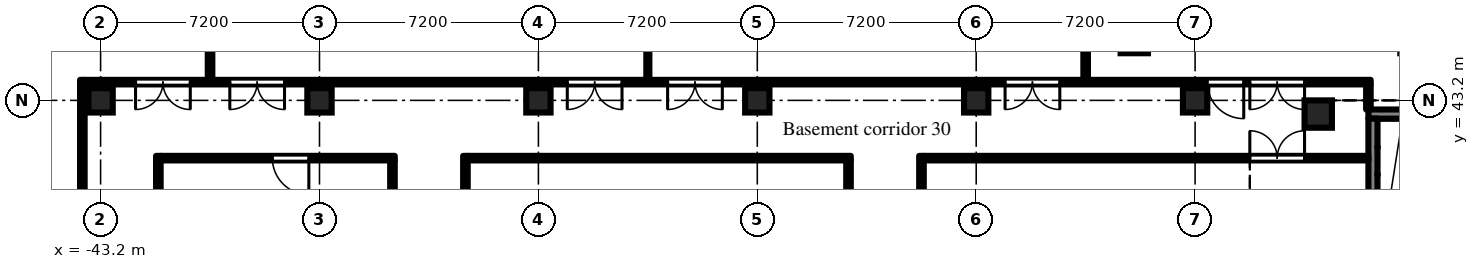
"""IFC4 building model, lengths in metres.
Left out: names, types, materials, properties, quantities, classifications, styles, units other than length and angle.
Written with IfcOpenShell. Run it as: python <this file> out.ifc"""

import sys

from ifc_helpers import new_model, si_unit, direction, frame, frame_2d, origin, origin_2d, place, context, subcontext, project, spatial, rectangle, extrude, element, fill, save


model = new_model("IFC4")
c1 = context("Model", 3, precision=1e-05, world=origin(), true_north=direction((0.0, 1.0)))
c2 = subcontext(c1, "Body", "Model", "MODEL_VIEW")
j1 = project(units=[si_unit("LENGTHUNIT", "METRE"), si_unit("PLANEANGLEUNIT", "RADIAN")], contexts=[c1])
p1 = place(None, origin())
s1 = spatial("IfcSite", under=j1, at=p1, CompositionType="ELEMENT")
p2 = place(p1, origin())
s2 = spatial("IfcBuilding", under=s1, at=p2, CompositionType="ELEMENT")
p3 = place(p2, frame((0.0, 0.0, -4.8)))
s3 = spatial("IfcBuildingStorey", under=s2, at=p3, CompositionType="ELEMENT", Elevation=-4.8)
p4 = place(p3, frame((-3.15, 42.75, -0.5), z_axis=(0.0, 0.0, 1.0), x_axis=(1.0, 0.0, 0.0)))
e1 = element("IfcColumn", 1, at=p4, inside=s3, PredefinedType="COLUMN", context=c2, shape_type="SweptSolid", body=[
    extrude(rectangle(XDim=0.9, YDim=0.9, at=origin_2d()), origin(), (0.0, 0.0, 1.0), 5.3),
])
for number, where, z_axis, x_axis in (
    (2, (-43.2, 43.2, -0.5), (0.0, 0.0, 1.0), (1.0, 0.0, 0.0)),
    (3, (-36.0, 43.2, -0.5), (0.0, 0.0, 1.0), (1.0, 0.0, 0.0)),
    (4, (-28.8, 43.2, -0.5), (0.0, 0.0, 1.0), (1.0, 0.0, 0.0)),
    (5, (-21.6, 43.2, -0.5), (0.0, 0.0, 1.0), (1.0, 0.0, 0.0)),
    (6, (-14.4, 43.2, -0.5), (0.0, 0.0, 1.0), (1.0, 0.0, 0.0)),
    (7, (-7.2, 43.2, -0.5), (0.0, 0.0, 1.0), (1.0, 0.0, 0.0)),
):
    element("IfcColumn", number, at=place(p3, frame(where, z_axis=z_axis, x_axis=x_axis)), inside=s3, PredefinedType="COLUMN", context=c2, shape_type="SweptSolid", body=[
        extrude(rectangle(XDim=0.8, YDim=0.8, at=origin_2d()), origin(), (0.0, 0.0, 1.0), 5.3),
    ])
p5 = place(p3, frame((-9.2, 45.2, -0.5), z_axis=(0.0, 0.0, 1.0), x_axis=(1.0, 0.0, 0.0)))
e8 = element("IfcColumn", 8, at=p5, inside=s3, PredefinedType="COLUMN", context=c2, shape_type="SweptSolid", body=[
    extrude(rectangle(XDim=0.9, YDim=0.9, at=origin_2d()), origin(), (0.0, 0.0, 1.0), 5.3),
])
p6 = place(p3, frame((-1.5, 42.75, 0.0), z_axis=(0.0, 0.0, 1.0), x_axis=(1.0, 0.0, 0.0)))
e9 = element("IfcWall", 9, at=p6, inside=s3, PredefinedType="SHEAR", context=c2, shape_type="SweptSolid", body=[
    extrude(rectangle(XDim=3.0, YDim=0.3, at=frame_2d((1.5, 0.0))), origin(), (0.0, 0.0, 1.0), 4.35),
])
p7 = place(p3, frame((-1.35, 36.8, 0.0), z_axis=(0.0, 0.0, 1.0), x_axis=(0.0, 1.0, 0.0)))
e10 = element("IfcWall", 10, at=p7, inside=s3, PredefinedType="SHEAR", context=c2, shape_type="SweptSolid", body=[
    extrude(rectangle(XDim=5.8, YDim=0.3, at=frame_2d((2.9, 0.0))), origin(), (0.0, 0.0, 1.0), 4.35),
])
p8 = place(p3, frame((-43.8, 33.525, 0.0), z_axis=(0.0, 0.0, 1.0), x_axis=(0.0, 1.0, 0.0)))
e11 = element("IfcWall", 11, at=p8, inside=s3, PredefinedType="PARTITIONING", context=c2, shape_type="SweptSolid", body=[
    extrude(rectangle(XDim=10.35, YDim=0.15, at=frame_2d((5.175, 0.0))), origin(), (0.0, 0.0, 1.0), 4.35),
])
p9 = place(p8, frame((4.025, 0.0, 0.0)))
e12 = element("IfcOpeningElement", 12, at=p9, cuts=e11, PredefinedType="OPENING", context=c2, shape_type="SweptSolid", body=[
    extrude(rectangle(XDim=1.2, YDim=2.1, at=frame_2d((0.6, 1.05))), frame((0.0, 0.085, 0.0), z_axis=(0.0, -1.0, 0.0), x_axis=(1.0, 0.0, 0.0)), (0.0, 0.0, 1.0), 0.17),
])
p10 = place(p3, frame((-43.725, 43.8, 0.0), z_axis=(0.0, 0.0, 1.0), x_axis=(1.0, 0.0, 0.0)))
e13 = element("IfcWall", 13, at=p10, inside=s3, PredefinedType="PARTITIONING", context=c2, shape_type="SweptSolid", body=[
    extrude(rectangle(XDim=42.3, YDim=0.15, at=frame_2d((21.15, 0.0))), origin(), (0.0, 0.0, 1.0), 4.35),
])
p11 = place(p10, frame((4.775, 0.0, 0.0)))
e14 = element("IfcOpeningElement", 14, at=p11, cuts=e13, PredefinedType="OPENING", context=c2, shape_type="SweptSolid", body=[
    extrude(rectangle(XDim=1.8, YDim=2.1, at=frame_2d((0.9, 1.05))), frame((0.0, 0.085, 0.0), z_axis=(0.0, -1.0, 0.0), x_axis=(1.0, 0.0, 0.0)), (0.0, 0.0, 1.0), 0.17),
])
p12 = place(p10, frame((15.875, 0.0, 0.0)))
e15 = element("IfcOpeningElement", 15, at=p12, cuts=e13, PredefinedType="OPENING", context=c2, shape_type="SweptSolid", body=[
    extrude(rectangle(XDim=1.8, YDim=2.1, at=frame_2d((0.9, 1.05))), frame((0.0, 0.085, 0.0), z_axis=(0.0, -1.0, 0.0), x_axis=(1.0, 0.0, 0.0)), (0.0, 0.0, 1.0), 0.17),
])
p13 = place(p10, frame((19.175, 0.0, 0.0)))
e16 = element("IfcOpeningElement", 16, at=p13, cuts=e13, PredefinedType="OPENING", context=c2, shape_type="SweptSolid", body=[
    extrude(rectangle(XDim=1.8, YDim=2.1, at=frame_2d((0.9, 1.05))), frame((0.0, 0.085, 0.0), z_axis=(0.0, -1.0, 0.0), x_axis=(1.0, 0.0, 0.0)), (0.0, 0.0, 1.0), 0.17),
])
p14 = place(p10, frame((30.275, 0.0, 0.0)))
e17 = element("IfcOpeningElement", 17, at=p14, cuts=e13, PredefinedType="OPENING", context=c2, shape_type="SweptSolid", body=[
    extrude(rectangle(XDim=1.8, YDim=2.1, at=frame_2d((0.9, 1.05))), frame((0.0, 0.085, 0.0), z_axis=(0.0, -1.0, 0.0), x_axis=(1.0, 0.0, 0.0)), (0.0, 0.0, 1.0), 0.17),
])
p15 = place(p10, frame((36.925, 0.0, 0.0)))
e18 = element("IfcOpeningElement", 18, at=p15, cuts=e13, PredefinedType="OPENING", context=c2, shape_type="SweptSolid", body=[
    extrude(rectangle(XDim=1.2, YDim=2.1, at=frame_2d((0.6, 1.05))), frame((0.0, 0.085, 0.0), z_axis=(0.0, -1.0, 0.0), x_axis=(1.0, 0.0, 0.0)), (0.0, 0.0, 1.0), 0.17),
])
p16 = place(p10, frame((38.325, 0.0, 0.0)))
e19 = element("IfcOpeningElement", 19, at=p16, cuts=e13, PredefinedType="OPENING", context=c2, shape_type="SweptSolid", body=[
    extrude(rectangle(XDim=1.8, YDim=2.1, at=frame_2d((0.9, 1.05))), frame((0.0, 0.085, 0.0), z_axis=(0.0, -1.0, 0.0), x_axis=(1.0, 0.0, 0.0)), (0.0, 0.0, 1.0), 0.17),
])
p17 = place(p10, frame((1.675, 0.0, 0.0)))
e20 = element("IfcOpeningElement", 20, at=p17, cuts=e13, PredefinedType="OPENING", context=c2, shape_type="SweptSolid", body=[
    extrude(rectangle(XDim=1.8, YDim=2.1, at=frame_2d((0.9, 1.05))), frame((0.0, 0.085, 0.0), z_axis=(0.0, -1.0, 0.0), x_axis=(1.0, 0.0, 0.0)), (0.0, 0.0, 1.0), 0.17),
])
p18 = place(p3, frame((-41.3, 33.525, 0.0), z_axis=(0.0, 0.0, 1.0), x_axis=(0.0, 1.0, 0.0)))
e21 = element("IfcWall", 21, at=p18, inside=s3, PredefinedType="PARTITIONING", context=c2, shape_type="SweptSolid", body=[
    extrude(rectangle(XDim=7.85, YDim=0.15, at=frame_2d((3.925, 0.0))), origin(), (0.0, 0.0, 1.0), 4.35),
])
p19 = place(p3, frame((-41.225, 41.3, 0.0), z_axis=(0.0, 0.0, 1.0), x_axis=(1.0, 0.0, 0.0)))
e22 = element("IfcWall", 22, at=p19, inside=s3, PredefinedType="PARTITIONING", context=c2, shape_type="SweptSolid", body=[
    extrude(rectangle(XDim=7.7, YDim=0.15, at=frame_2d((3.85, 0.0))), origin(), (0.0, 0.0, 1.0), 4.35),
])
p20 = place(p19, frame((3.675, 0.0, 0.0)))
e23 = element("IfcOpeningElement", 23, at=p20, cuts=e22, PredefinedType="OPENING", context=c2, shape_type="SweptSolid", body=[
    extrude(rectangle(XDim=1.2, YDim=2.1, at=frame_2d((0.6, 1.05))), frame((0.0, 0.085, 0.0), z_axis=(0.0, -1.0, 0.0), x_axis=(1.0, 0.0, 0.0)), (0.0, 0.0, 1.0), 0.17),
])
p21 = place(p3, frame((-39.6, 43.875, 0.0), z_axis=(0.0, 0.0, 1.0), x_axis=(0.0, 1.0, 0.0)))
e24 = element("IfcWall", 24, at=p21, inside=s3, PredefinedType="PARTITIONING", context=c2, shape_type="SweptSolid", body=[
    extrude(rectangle(XDim=6.345, YDim=0.15, at=frame_2d((3.172, 0.0))), origin(), (0.0, 0.0, 1.0), 4.35),
])
p22 = place(p3, frame((-33.6, 33.675, 0.0), z_axis=(0.0, 0.0, 1.0), x_axis=(0.0, 1.0, 0.0)))
e25 = element("IfcWall", 25, at=p22, inside=s3, PredefinedType="PARTITIONING", context=c2, shape_type="SweptSolid", body=[
    extrude(rectangle(XDim=7.55, YDim=0.15, at=frame_2d((3.775, 0.0))), origin(), (0.0, 0.0, 1.0), 4.35),
])
p23 = place(p3, frame((-31.2, 33.525, 0.0), z_axis=(0.0, 0.0, 1.0), x_axis=(0.0, 1.0, 0.0)))
e26 = element("IfcWall", 26, at=p23, inside=s3, PredefinedType="PARTITIONING", context=c2, shape_type="SweptSolid", body=[
    extrude(rectangle(XDim=7.85, YDim=0.15, at=frame_2d((3.925, 0.0))), origin(), (0.0, 0.0, 1.0), 4.35),
])
p24 = place(p23, frame((3.525, 0.0, 0.0)))
e27 = element("IfcOpeningElement", 27, at=p24, cuts=e26, PredefinedType="OPENING", context=c2, shape_type="SweptSolid", body=[
    extrude(rectangle(XDim=1.8, YDim=2.1, at=frame_2d((0.9, 1.05))), frame((0.0, 0.085, 0.0), z_axis=(0.0, -1.0, 0.0), x_axis=(1.0, 0.0, 0.0)), (0.0, 0.0, 1.0), 0.17),
])
p25 = place(p3, frame((-31.125, 41.3, 0.0), z_axis=(0.0, 0.0, 1.0), x_axis=(1.0, 0.0, 0.0)))
e28 = element("IfcWall", 28, at=p25, inside=s3, PredefinedType="PARTITIONING", context=c2, shape_type="SweptSolid", body=[
    extrude(rectangle(XDim=12.6, YDim=0.15, at=frame_2d((6.3, 0.0))), origin(), (0.0, 0.0, 1.0), 4.35),
])
p26 = place(p3, frame((-25.2, 43.875, 0.0), z_axis=(0.0, 0.0, 1.0), x_axis=(0.0, 1.0, 0.0)))
e29 = element("IfcWall", 29, at=p26, inside=s3, PredefinedType="PARTITIONING", context=c2, shape_type="SweptSolid", body=[
    extrude(rectangle(XDim=6.345, YDim=0.1, at=frame_2d((3.172, 0.0))), origin(), (0.0, 0.0, 1.0), 4.35),
])
p27 = place(p3, frame((-18.6, 33.675, 0.0), z_axis=(0.0, 0.0, 1.0), x_axis=(0.0, 1.0, 0.0)))
e30 = element("IfcWall", 30, at=p27, inside=s3, PredefinedType="PARTITIONING", context=c2, shape_type="SweptSolid", body=[
    extrude(rectangle(XDim=7.55, YDim=0.15, at=frame_2d((3.775, 0.0))), origin(), (0.0, 0.0, 1.0), 4.35),
])
p28 = place(p27, frame((2.375, 0.0, 0.0)))
e31 = element("IfcOpeningElement", 31, at=p28, cuts=e30, PredefinedType="OPENING", context=c2, shape_type="SweptSolid", body=[
    extrude(rectangle(XDim=1.8, YDim=2.1, at=frame_2d((0.9, 1.05))), frame((0.0, 0.085, 0.0), z_axis=(0.0, -1.0, 0.0), x_axis=(1.0, 0.0, 0.0)), (0.0, 0.0, 1.0), 0.17),
])
p29 = place(p3, frame((-16.2, 33.525, 0.0), z_axis=(0.0, 0.0, 1.0), x_axis=(0.0, 1.0, 0.0)))
e32 = element("IfcWall", 32, at=p29, inside=s3, PredefinedType="PARTITIONING", context=c2, shape_type="SweptSolid", body=[
    extrude(rectangle(XDim=7.85, YDim=0.15, at=frame_2d((3.925, 0.0))), origin(), (0.0, 0.0, 1.0), 4.35),
])
p30 = place(p29, frame((3.525, 0.0, 0.0)))
e33 = element("IfcOpeningElement", 33, at=p30, cuts=e32, PredefinedType="OPENING", context=c2, shape_type="SweptSolid", body=[
    extrude(rectangle(XDim=1.8, YDim=2.1, at=frame_2d((0.9, 1.05))), frame((0.0, 0.085, 0.0), z_axis=(0.0, -1.0, 0.0), x_axis=(1.0, 0.0, 0.0)), (0.0, 0.0, 1.0), 0.17),
])
p31 = place(p3, frame((-16.125, 41.3, 0.0), z_axis=(0.0, 0.0, 1.0), x_axis=(1.0, 0.0, 0.0)))
e34 = element("IfcWall", 34, at=p31, inside=s3, PredefinedType="PARTITIONING", context=c2, shape_type="SweptSolid", body=[
    extrude(rectangle(XDim=14.625, YDim=0.15, at=frame_2d((7.312, 0.0))), origin(), (0.0, 0.0, 1.0), 4.35),
])
p32 = place(p31, frame((10.725, 0.0, 0.0)))
e35 = element("IfcOpeningElement", 35, at=p32, cuts=e34, PredefinedType="OPENING", context=c2, shape_type="SweptSolid", body=[
    extrude(rectangle(XDim=1.8, YDim=2.1, at=frame_2d((0.9, 1.05))), frame((0.0, 0.085, 0.0), z_axis=(0.0, -1.0, 0.0), x_axis=(1.0, 0.0, 0.0)), (0.0, 0.0, 1.0), 0.17),
])
p33 = place(p3, frame((-10.8, 43.875, 0.0), z_axis=(0.0, 0.0, 1.0), x_axis=(0.0, 1.0, 0.0)))
e36 = element("IfcWall", 36, at=p33, inside=s3, PredefinedType="PARTITIONING", context=c2, shape_type="SweptSolid", body=[
    extrude(rectangle(XDim=6.345, YDim=0.15, at=frame_2d((3.172, 0.0))), origin(), (0.0, 0.0, 1.0), 4.35),
])
p34 = place(p3, frame((-1.5, 42.9, 0.0), z_axis=(0.0, 0.0, 1.0), x_axis=(0.0, 1.0, 0.0)))
e37 = element("IfcWall", 37, at=p34, inside=s3, PredefinedType="PARTITIONING", context=c2, shape_type="SweptSolid", body=[
    extrude(rectangle(XDim=0.825, YDim=0.15, at=frame_2d((0.413, 0.0))), origin(), (0.0, 0.0, 1.0), 4.35),
])
p35 = place(p11, frame((1.8, 0.0, 0.0), z_axis=(0.0, 0.0, 1.0), x_axis=(-1.0, 0.0, 0.0)))
e38 = element("IfcDoor", 38, at=p35, inside=s3, OperationType="DOUBLE_DOOR_DOUBLE_SWING", PredefinedType="DOOR", context=c2, shape_type="SweptSolid", body=[
    extrude(rectangle(XDim=1.8, YDim=2.1, at=frame_2d((0.9, 1.05))), frame((0.0, 0.025, 0.0), z_axis=(0.0, -1.0, 0.0), x_axis=(1.0, 0.0, 0.0)), (0.0, 0.0, 1.0), 0.05),
])
fill(e14, e38)
p36 = place(p12, frame((1.8, 0.0, 0.0), z_axis=(0.0, 0.0, 1.0), x_axis=(-1.0, 0.0, 0.0)))
e39 = element("IfcDoor", 39, at=p36, inside=s3, OperationType="DOUBLE_DOOR_DOUBLE_SWING", PredefinedType="DOOR", context=c2, shape_type="SweptSolid", body=[
    extrude(rectangle(XDim=1.8, YDim=2.1, at=frame_2d((0.9, 1.05))), frame((0.0, 0.025, 0.0), z_axis=(0.0, -1.0, 0.0), x_axis=(1.0, 0.0, 0.0)), (0.0, 0.0, 1.0), 0.05),
])
fill(e15, e39)
p37 = place(p13, frame((1.8, 0.0, 0.0), z_axis=(0.0, 0.0, 1.0), x_axis=(-1.0, 0.0, 0.0)))
e40 = element("IfcDoor", 40, at=p37, inside=s3, OperationType="DOUBLE_DOOR_DOUBLE_SWING", PredefinedType="DOOR", context=c2, shape_type="SweptSolid", body=[
    extrude(rectangle(XDim=1.8, YDim=2.1, at=frame_2d((0.9, 1.05))), frame((0.0, 0.025, 0.0), z_axis=(0.0, -1.0, 0.0), x_axis=(1.0, 0.0, 0.0)), (0.0, 0.0, 1.0), 0.05),
])
fill(e16, e40)
p38 = place(p14, frame((1.8, 0.0, 0.0), z_axis=(0.0, 0.0, 1.0), x_axis=(-1.0, 0.0, 0.0)))
e41 = element("IfcDoor", 41, at=p38, inside=s3, OperationType="DOUBLE_DOOR_DOUBLE_SWING", PredefinedType="DOOR", context=c2, shape_type="SweptSolid", body=[
    extrude(rectangle(XDim=1.8, YDim=2.1, at=frame_2d((0.9, 1.05))), frame((0.0, 0.025, 0.0), z_axis=(0.0, -1.0, 0.0), x_axis=(1.0, 0.0, 0.0)), (0.0, 0.0, 1.0), 0.05),
])
fill(e17, e41)
p39 = place(p15, frame((1.2, 0.0, 0.0), z_axis=(0.0, 0.0, 1.0), x_axis=(-1.0, 0.0, 0.0)))
e42 = element("IfcDoor", 42, at=p39, inside=s3, OperationType="SINGLE_SWING_LEFT", PredefinedType="DOOR", context=c2, shape_type="SweptSolid", body=[
    extrude(rectangle(XDim=1.2, YDim=2.1, at=frame_2d((0.6, 1.05))), frame((0.0, 0.025, 0.0), z_axis=(0.0, -1.0, 0.0), x_axis=(1.0, 0.0, 0.0)), (0.0, 0.0, 1.0), 0.05),
])
fill(e18, e42)
p40 = place(p16, frame((1.8, 0.0, 0.0), z_axis=(0.0, 0.0, 1.0), x_axis=(-1.0, 0.0, 0.0)))
e43 = element("IfcDoor", 43, at=p40, inside=s3, OperationType="DOUBLE_DOOR_DOUBLE_SWING", PredefinedType="DOOR", context=c2, shape_type="SweptSolid", body=[
    extrude(rectangle(XDim=1.8, YDim=2.1, at=frame_2d((0.9, 1.05))), frame((0.0, 0.025, 0.0), z_axis=(0.0, -1.0, 0.0), x_axis=(1.0, 0.0, 0.0)), (0.0, 0.0, 1.0), 0.05),
])
fill(e19, e43)
p41 = place(p17, frame((1.8, 0.0, 0.0), z_axis=(0.0, 0.0, 1.0), x_axis=(-1.0, 0.0, 0.0)))
e44 = element("IfcDoor", 44, at=p41, inside=s3, OperationType="DOUBLE_DOOR_DOUBLE_SWING", PredefinedType="DOOR", context=c2, shape_type="SweptSolid", body=[
    extrude(rectangle(XDim=1.8, YDim=2.1, at=frame_2d((0.9, 1.05))), frame((0.0, 0.025, 0.0), z_axis=(0.0, -1.0, 0.0), x_axis=(1.0, 0.0, 0.0)), (0.0, 0.0, 1.0), 0.05),
])
fill(e20, e44)
p42 = place(p20, frame((1.2, 0.0, 0.0), z_axis=(0.0, 0.0, 1.0), x_axis=(-1.0, 0.0, 0.0)))
e45 = element("IfcDoor", 45, at=p42, inside=s3, OperationType="SINGLE_SWING_LEFT", PredefinedType="DOOR", context=c2, shape_type="SweptSolid", body=[
    extrude(rectangle(XDim=1.2, YDim=2.1, at=frame_2d((0.6, 1.05))), frame((0.0, 0.025, 0.0), z_axis=(0.0, -1.0, 0.0), x_axis=(1.0, 0.0, 0.0)), (0.0, 0.0, 1.0), 0.05),
])
fill(e23, e45)
p43 = place(p32, origin())
e46 = element("IfcDoor", 46, at=p43, inside=s3, OperationType="DOUBLE_DOOR_DOUBLE_SWING", PredefinedType="DOOR", context=c2, shape_type="SweptSolid", body=[
    extrude(rectangle(XDim=1.8, YDim=2.1, at=frame_2d((0.9, 1.05))), frame((0.0, 0.025, 0.0), z_axis=(0.0, -1.0, 0.0), x_axis=(1.0, 0.0, 0.0)), (0.0, 0.0, 1.0), 0.05),
])
fill(e35, e46)
save(model, sys.argv[1])
